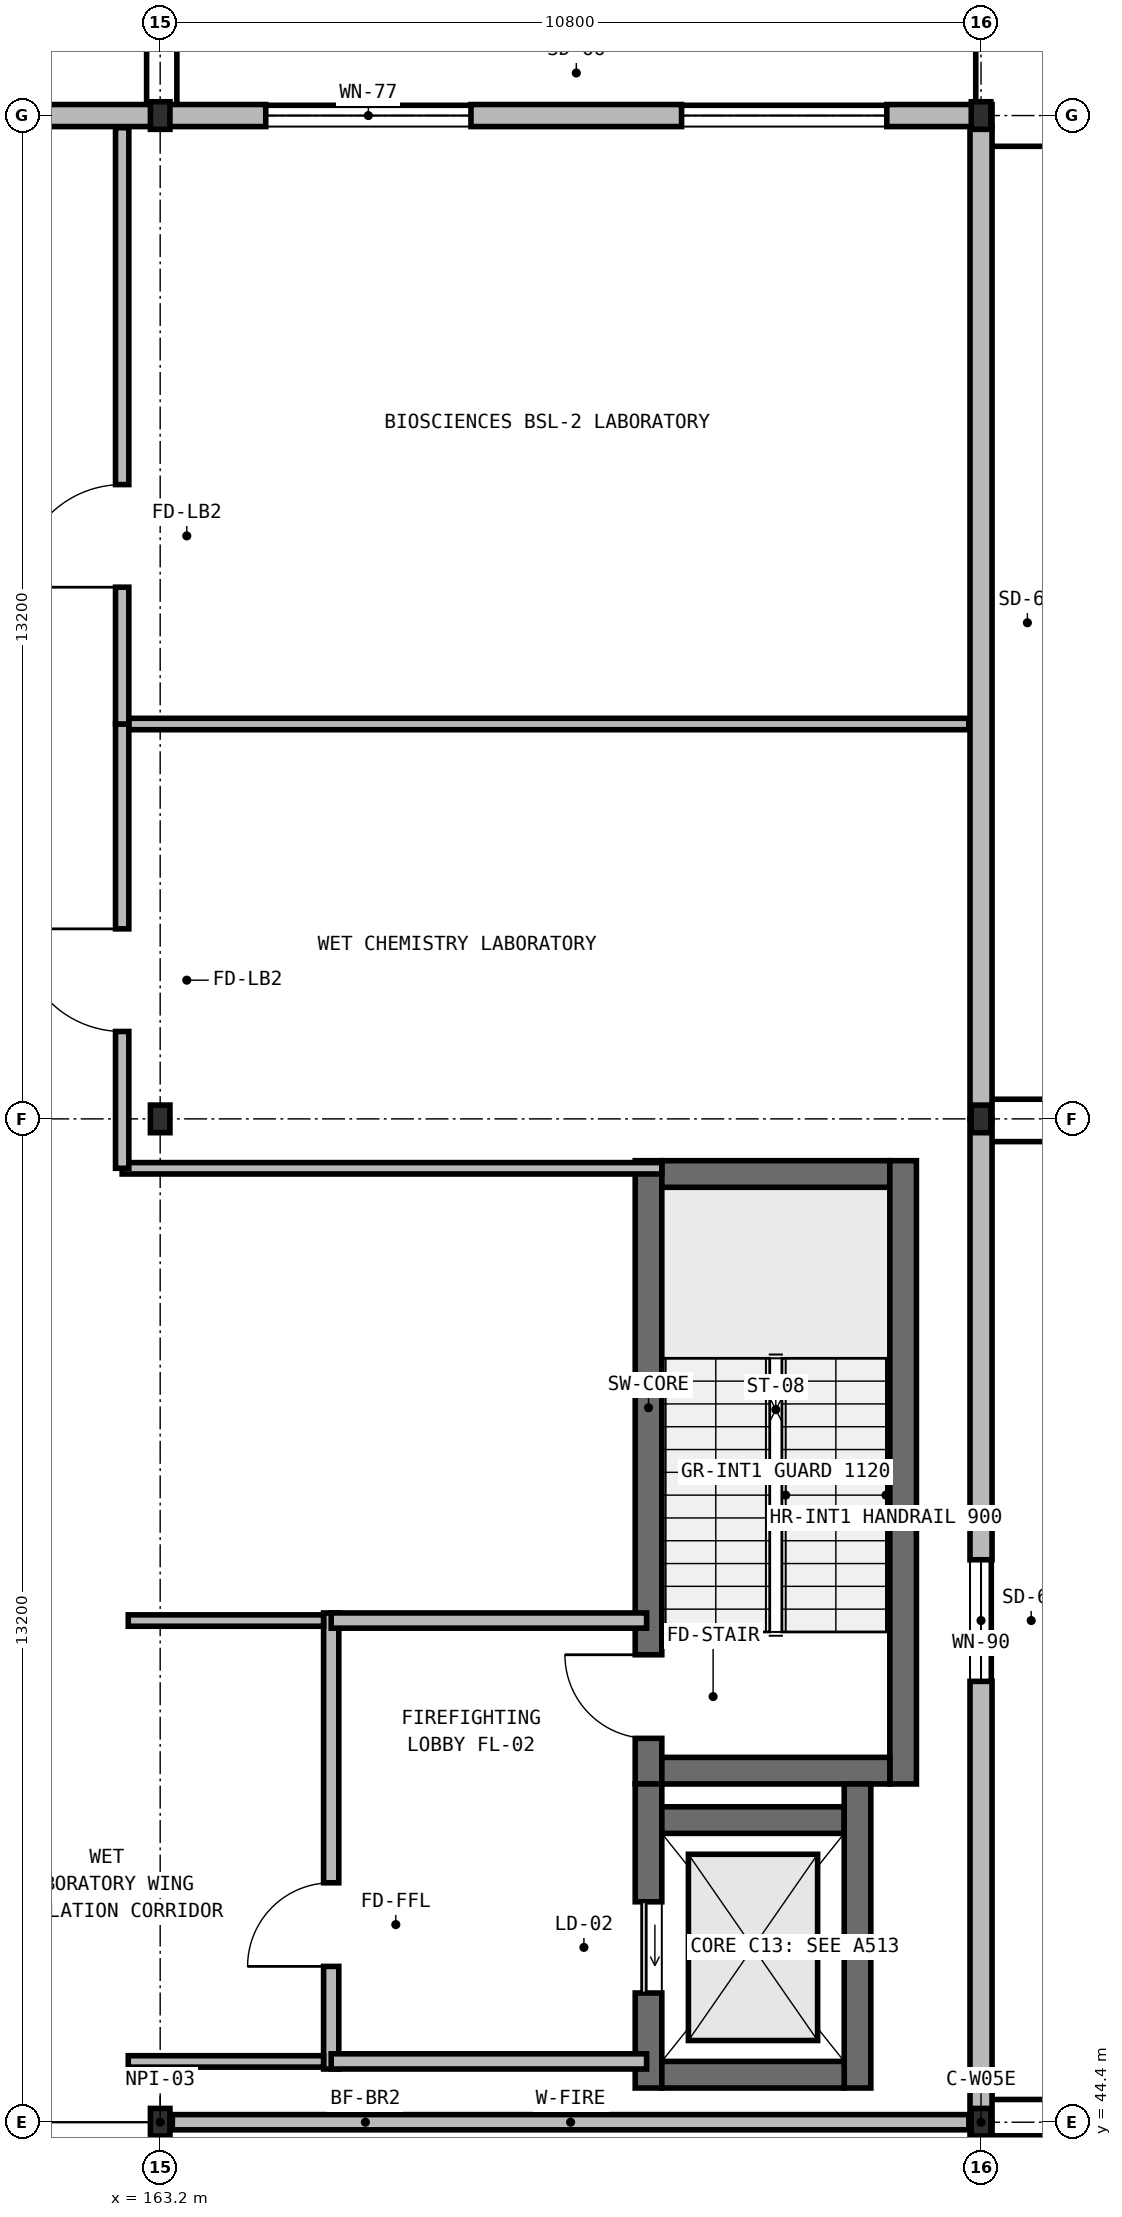
"""IFC4 building model, lengths in metres.
Left out: names, types, materials, properties, quantities, classifications, styles, units other than length and angle.
Written with IfcOpenShell. Run it as: python <this file> out.ifc"""

import sys

from ifc_helpers import new_model, si_unit, direction, frame, frame_2d, origin, origin_2d, place, context, subcontext, project, spatial, rectangle, i_section, extrude, element, fill, save


model = new_model("IFC4")
c1 = context("Model", 3, precision=1e-05, world=origin(), true_north=direction((0.0, 1.0)))
c2 = subcontext(c1, "Body", "Model", "MODEL_VIEW")
j1 = project(units=[si_unit("LENGTHUNIT", "METRE"), si_unit("PLANEANGLEUNIT", "RADIAN")], contexts=[c1])
p1 = place(None, origin())
s1 = spatial("IfcSite", under=j1, at=p1, CompositionType="ELEMENT")
p2 = place(p1, origin())
s2 = spatial("IfcBuilding", under=s1, at=p2, CompositionType="ELEMENT")
p3 = place(p2, frame((0.0, 0.0, 32.55)))
s3 = spatial("IfcBuildingStorey", under=s2, at=p3, CompositionType="ELEMENT", Elevation=32.55)
p4 = place(p3, frame((169.625, 48.85, 0.0), z_axis=(0.0, 0.0, 1.0), x_axis=(0.0, 1.0, 0.0)))
e1 = element("IfcWall", 1, at=p4, inside=s3, PredefinedType="SHEAR", context=c2, shape_type="SweptSolid", body=[
    extrude(rectangle(XDim=8.2, YDim=0.35, at=frame_2d((4.1, 0.0))), origin(), (0.0, 0.0, 1.0), 4.55),
])
p5 = place(p4, frame((0.6, 0.0, 0.0)))
e2 = element("IfcOpeningElement", 2, at=p5, cuts=e1, PredefinedType="OPENING", context=c2, shape_type="SweptSolid", body=[
    extrude(rectangle(XDim=1.1, YDim=2.15, at=frame_2d((0.55, 1.075))), frame((0.0, 0.185, 0.0), z_axis=(0.0, -1.0, 0.0), x_axis=(1.0, 0.0, 0.0)), (0.0, 0.0, 1.0), 0.37),
])
p6 = place(p3, frame((169.8, 56.875, 0.0), z_axis=(0.0, 0.0, 1.0), x_axis=(1.0, 0.0, 0.0)))
e3 = element("IfcWall", 3, at=p6, inside=s3, PredefinedType="SHEAR", context=c2, shape_type="SweptSolid", body=[
    extrude(rectangle(XDim=3.0, YDim=0.35, at=frame_2d((1.5, 0.0))), origin(), (0.0, 0.0, 1.0), 4.55),
])
p7 = place(p3, frame((172.975, 57.05, 0.0), z_axis=(0.0, 0.0, 1.0), x_axis=(0.0, -1.0, 0.0)))
e4 = element("IfcWall", 4, at=p7, inside=s3, PredefinedType="SHEAR", context=c2, shape_type="SweptSolid", body=[
    extrude(rectangle(XDim=8.2, YDim=0.35, at=frame_2d((4.1, 0.0))), origin(), (0.0, 0.0, 1.0), 4.55),
])
p8 = place(p3, frame((172.8, 49.025, 0.0), z_axis=(0.0, 0.0, 1.0), x_axis=(-1.0, 0.0, 0.0)))
e5 = element("IfcWall", 5, at=p8, inside=s3, PredefinedType="SHEAR", context=c2, shape_type="SweptSolid", body=[
    extrude(rectangle(XDim=3.0, YDim=0.35, at=frame_2d((1.5, 0.0))), origin(), (0.0, 0.0, 1.0), 4.55),
])
p9 = place(p3, frame((169.625, 44.85, 0.0), z_axis=(0.0, 0.0, 1.0), x_axis=(0.0, 1.0, 0.0)))
e6 = element("IfcWall", 6, at=p9, inside=s3, PredefinedType="SHEAR", context=c2, shape_type="SweptSolid", body=[
    extrude(rectangle(XDim=4.0, YDim=0.35, at=frame_2d((2.0, 0.0))), origin(), (0.0, 0.0, 1.0), 4.55),
])
p10 = place(p9, frame((1.25, 0.0, 0.0)))
e7 = element("IfcOpeningElement", 7, at=p10, cuts=e6, PredefinedType="OPENING", context=c2, shape_type="SweptSolid", body=[
    extrude(rectangle(XDim=1.2, YDim=2.15, at=frame_2d((0.6, 1.075))), frame((0.0, 0.185, 0.0), z_axis=(0.0, -1.0, 0.0), x_axis=(1.0, 0.0, 0.0)), (0.0, 0.0, 1.0), 0.37),
])
p11 = place(p3, frame((169.8, 48.375, 0.0), z_axis=(0.0, 0.0, 1.0), x_axis=(1.0, 0.0, 0.0)))
e8 = element("IfcWall", 8, at=p11, inside=s3, PredefinedType="SHEAR", context=c2, shape_type="SweptSolid", body=[
    extrude(rectangle(XDim=2.4, YDim=0.35, at=frame_2d((1.2, 0.0))), origin(), (0.0, 0.0, 1.0), 4.55),
])
p12 = place(p3, frame((172.375, 48.85, 0.0), z_axis=(0.0, 0.0, 1.0), x_axis=(0.0, -1.0, 0.0)))
e9 = element("IfcWall", 9, at=p12, inside=s3, PredefinedType="SHEAR", context=c2, shape_type="SweptSolid", body=[
    extrude(rectangle(XDim=4.0, YDim=0.35, at=frame_2d((2.0, 0.0))), origin(), (0.0, 0.0, 1.0), 4.55),
])
p13 = place(p3, frame((172.2, 45.025, 0.0), z_axis=(0.0, 0.0, 1.0), x_axis=(-1.0, 0.0, 0.0)))
e10 = element("IfcWall", 10, at=p13, inside=s3, PredefinedType="SHEAR", context=c2, shape_type="SweptSolid", body=[
    extrude(rectangle(XDim=2.4, YDim=0.35, at=frame_2d((1.2, 0.0))), origin(), (0.0, 0.0, 1.0), 4.55),
])
for number, where, z_axis, x_axis in (
    (11, (163.2, 44.4, 0.0), (0.0, 0.0, 1.0), (1.0, 0.0, 0.0)),
    (12, (163.2, 57.6, 0.0), (0.0, 0.0, 1.0), (1.0, 0.0, 0.0)),
    (13, (163.2, 70.8, 0.0), (0.0, 0.0, 1.0), (1.0, 0.0, 0.0)),
    (14, (174.0, 44.4, 0.0), (0.0, 0.0, 1.0), (1.0, 0.0, 0.0)),
    (15, (174.0, 57.6, 0.0), (0.0, 0.0, 1.0), (1.0, 0.0, 0.0)),
    (16, (174.0, 70.8, 0.0), (0.0, 0.0, 1.0), (1.0, 0.0, 0.0)),
):
    element("IfcColumn", number, at=place(p3, frame(where, z_axis=z_axis, x_axis=x_axis)), inside=s3, PredefinedType="COLUMN", context=c2, shape_type="SweptSolid", body=[
        extrude(i_section(OverallWidth=0.257, OverallDepth=0.363, WebThickness=0.013, FlangeThickness=0.022, at=origin_2d()), origin(), (0.0, 0.0, 1.0), 4.55),
    ])
p14 = place(p3, frame((153.455, 70.8, 0.0), z_axis=(0.0, 0.0, 1.0), x_axis=(1.0, 0.0, 0.0)))
e17 = element("IfcWall", 17, at=p14, inside=s3, PredefinedType="SOLIDWALL", context=c2, shape_type="SweptSolid", body=[
    extrude(rectangle(XDim=9.741, YDim=0.29, at=frame_2d((4.871, 0.0))), origin(), (0.0, 0.0, 1.0), 3.763),
])
p15 = place(p14, frame((1.25, 0.0, 0.95)))
e18 = element("IfcOpeningElement", 18, at=p15, cuts=e17, PredefinedType="OPENING", context=c2, shape_type="SweptSolid", body=[
    extrude(rectangle(XDim=2.37, YDim=1.8, at=frame_2d((1.185, 0.9))), frame((0.0, 0.155, 0.0), z_axis=(0.0, -1.0, 0.0), x_axis=(1.0, 0.0, 0.0)), (0.0, 0.0, 1.0), 0.31),
])
p16 = place(p3, frame((163.204, 70.8, 0.0), z_axis=(0.0, 0.0, 1.0), x_axis=(1.0, 0.0, 0.0)))
e19 = element("IfcWall", 19, at=p16, inside=s3, PredefinedType="SOLIDWALL", context=c2, shape_type="SweptSolid", body=[
    extrude(rectangle(XDim=10.941, YDim=0.29, at=frame_2d((5.47, 0.0))), origin(), (0.0, 0.0, 1.0), 3.685),
])
p17 = place(p16, frame((1.385, 0.0, 0.95)))
e20 = element("IfcOpeningElement", 20, at=p17, cuts=e19, PredefinedType="OPENING", context=c2, shape_type="SweptSolid", body=[
    extrude(rectangle(XDim=2.7, YDim=1.72, at=frame_2d((1.35, 0.86))), frame((0.0, 0.155, 0.0), z_axis=(0.0, -1.0, 0.0), x_axis=(1.0, 0.0, 0.0)), (0.0, 0.0, 1.0), 0.31),
])
p18 = place(p16, frame((6.856, 0.0, 0.95)))
e21 = element("IfcOpeningElement", 21, at=p18, cuts=e19, PredefinedType="OPENING", context=c2, shape_type="SweptSolid", body=[
    extrude(rectangle(XDim=2.7, YDim=1.72, at=frame_2d((1.35, 0.86))), frame((0.0, 0.155, 0.0), z_axis=(0.0, -1.0, 0.0), x_axis=(1.0, 0.0, 0.0)), (0.0, 0.0, 1.0), 0.31),
])
p19 = place(p3, frame((174.0, 70.651, 0.0), z_axis=(0.0, 0.0, 1.0), x_axis=(0.0, -1.0, 0.0)))
e22 = element("IfcWall", 22, at=p19, inside=s3, PredefinedType="SOLIDWALL", context=c2, shape_type="SweptSolid", body=[
    extrude(rectangle(XDim=13.047, YDim=0.29, at=frame_2d((6.523, 0.0))), origin(), (0.0, 0.0, 1.0), 3.767),
])
p20 = place(p3, frame((174.0, 57.596, 0.0), z_axis=(0.0, 0.0, 1.0), x_axis=(0.0, -1.0, 0.0)))
e23 = element("IfcWall", 23, at=p20, inside=s3, PredefinedType="SOLIDWALL", context=c2, shape_type="SweptSolid", body=[
    extrude(rectangle(XDim=13.192, YDim=0.29, at=frame_2d((6.596, 0.0))), origin(), (0.0, 0.0, 1.0), 3.83),
])
p21 = place(p20, frame((5.796, 0.0, 0.95)))
e24 = element("IfcOpeningElement", 24, at=p21, cuts=e23, PredefinedType="OPENING", context=c2, shape_type="SweptSolid", body=[
    extrude(rectangle(XDim=1.6, YDim=1.56, at=frame_2d((0.8, 0.78))), frame((0.0, 0.155, 0.0), z_axis=(0.0, -1.0, 0.0), x_axis=(1.0, 0.0, 0.0)), (0.0, 0.0, 1.0), 0.31),
])
p22 = place(p3, frame((174.0, 44.396, 0.0), z_axis=(0.0, 0.0, 1.0), x_axis=(0.0, -1.0, 0.0)))
e25 = element("IfcWall", 25, at=p22, inside=s3, PredefinedType="SOLIDWALL", context=c2, shape_type="SweptSolid", body=[
    extrude(rectangle(XDim=9.592, YDim=0.29, at=frame_2d((4.796, 0.0))), origin(), (0.0, 0.0, 1.0), 3.899),
])
p23 = place(p22, frame((3.831, 0.0, 0.95)))
e26 = element("IfcOpeningElement", 26, at=p23, cuts=e25, PredefinedType="OPENING", context=c2, shape_type="SweptSolid", body=[
    extrude(rectangle(XDim=1.93, YDim=1.48, at=frame_2d((0.965, 0.74))), frame((0.0, 0.155, 0.0), z_axis=(0.0, -1.0, 0.0), x_axis=(1.0, 0.0, 0.0)), (0.0, 0.0, 1.0), 0.31),
])
p24 = place(p3, frame((163.36, 44.4, 0.0), z_axis=(0.0, 0.0, 1.0), x_axis=(1.0, 0.0, 0.0)))
e27 = element("IfcWall", 27, at=p24, inside=s3, PredefinedType="SOLIDWALL", context=c2, shape_type="SweptSolid", body=[
    extrude(rectangle(XDim=10.48, YDim=0.2, at=frame_2d((5.24, 0.0))), origin(), (0.0, 0.0, 1.0), 3.753),
])
p25 = place(p3, frame((165.45, 45.1, 0.0), z_axis=(0.0, 0.0, 1.0), x_axis=(0.0, 1.0, 0.0)))
e28 = element("IfcWall", 28, at=p25, inside=s3, PredefinedType="SOLIDWALL", context=c2, shape_type="SweptSolid", body=[
    extrude(rectangle(XDim=6.0, YDim=0.2, at=frame_2d((3.0, 0.0))), origin(), (0.0, 0.0, 1.0), 4.3),
])
p26 = place(p25, frame((1.35, 0.0, 0.0)))
e29 = element("IfcOpeningElement", 29, at=p26, cuts=e28, PredefinedType="OPENING", context=c2, shape_type="SweptSolid", body=[
    extrude(rectangle(XDim=1.1, YDim=2.15, at=frame_2d((0.55, 1.075))), frame((0.0, 0.11, 0.0), z_axis=(0.0, -1.0, 0.0), x_axis=(1.0, 0.0, 0.0)), (0.0, 0.0, 1.0), 0.22),
])
for number, where, z_axis, x_axis in (
    (30, (165.45, 45.2, 0.0), (0.0, 0.0, 1.0), (1.0, 0.0, 0.0)),
    (31, (165.45, 51.0, 0.0), (0.0, 0.0, 1.0), (1.0, 0.0, 0.0)),
):
    element("IfcWall", number, at=place(p3, frame(where, z_axis=z_axis, x_axis=x_axis)), inside=s3, PredefinedType="SOLIDWALL", context=c2, shape_type="SweptSolid", body=[
        extrude(rectangle(XDim=4.15, YDim=0.2, at=frame_2d((2.075, 0.0))), origin(), (0.0, 0.0, 1.0), 4.3),
    ])
p27 = place(p3, frame((162.7, 56.95, 0.0), z_axis=(0.0, 0.0, 1.0), x_axis=(1.0, 0.0, 0.0)))
e32 = element("IfcWall", 32, at=p27, inside=s3, PredefinedType="PARTITIONING", context=c2, shape_type="SweptSolid", body=[
    extrude(rectangle(XDim=7.1, YDim=0.15, at=frame_2d((3.55, 0.0))), origin(), (0.0, 0.0, 1.0), 4.3),
])
p28 = place(p3, frame((162.7, 56.95, 0.0), z_axis=(0.0, 0.0, 1.0), x_axis=(0.0, 1.0, 0.0)))
e33 = element("IfcWall", 33, at=p28, inside=s3, PredefinedType="PARTITIONING", context=c2, shape_type="SweptSolid", body=[
    extrude(rectangle(XDim=5.845, YDim=0.175, at=frame_2d((2.922, 0.0))), origin(), (0.0, 0.0, 1.0), 4.3),
])
p29 = place(p28, frame((1.8, 0.0, 0.0)))
e34 = element("IfcOpeningElement", 34, at=p29, cuts=e33, PredefinedType="OPENING", context=c2, shape_type="SweptSolid", body=[
    extrude(rectangle(XDim=1.35, YDim=2.2, at=frame_2d((0.675, 1.1))), frame((0.0, 0.097, 0.0), z_axis=(0.0, -1.0, 0.0), x_axis=(1.0, 0.0, 0.0)), (0.0, 0.0, 1.0), 0.195),
])
p30 = place(p3, frame((162.7, 62.795, 0.0), z_axis=(0.0, 0.0, 1.0), x_axis=(0.0, 1.0, 0.0)))
e35 = element("IfcWall", 35, at=p30, inside=s3, PredefinedType="PARTITIONING", context=c2, shape_type="SweptSolid", body=[
    extrude(rectangle(XDim=7.845, YDim=0.175, at=frame_2d((3.922, 0.0))), origin(), (0.0, 0.0, 1.0), 4.3),
])
p31 = place(p30, frame((1.8, 0.0, 0.0)))
e36 = element("IfcOpeningElement", 36, at=p31, cuts=e35, PredefinedType="OPENING", context=c2, shape_type="SweptSolid", body=[
    extrude(rectangle(XDim=1.35, YDim=2.2, at=frame_2d((0.675, 1.1))), frame((0.0, 0.097, 0.0), z_axis=(0.0, -1.0, 0.0), x_axis=(1.0, 0.0, 0.0)), (0.0, 0.0, 1.0), 0.195),
])
p32 = place(p3, frame((162.79, 62.795, 0.0), z_axis=(0.0, 0.0, 1.0), x_axis=(1.0, 0.0, 0.0)))
e37 = element("IfcWall", 37, at=p32, inside=s3, PredefinedType="PARTITIONING", context=c2, shape_type="SweptSolid", body=[
    extrude(rectangle(XDim=11.05, YDim=0.15, at=frame_2d((5.525, 0.0))), origin(), (0.0, 0.0, 1.0), 4.3),
])
for number, where, z_axis, x_axis in (
    (38, (162.78, 45.2, 0.0), (0.0, 0.0, 1.0), (1.0, 0.0, 0.0)),
    (39, (162.78, 51.0, 0.0), (0.0, 0.0, 1.0), (1.0, 0.0, 0.0)),
):
    element("IfcWall", number, at=place(p3, frame(where, z_axis=z_axis, x_axis=x_axis)), inside=s3, PredefinedType="PARTITIONING", context=c2, shape_type="SweptSolid", body=[
        extrude(rectangle(XDim=2.57, YDim=0.15, at=frame_2d((1.285, 0.0))), origin(), (0.0, 0.0, 1.0), 4.3),
    ])
p33 = place(p17, origin())
e40 = element("IfcWindow", 40, at=p33, inside=s3, PartitioningType="SINGLE_PANEL", PredefinedType="WINDOW", context=c2, shape_type="SweptSolid", body=[
    extrude(rectangle(XDim=2.7, YDim=1.72, at=frame_2d((1.35, 0.86))), frame((0.0, 0.03, 0.0), z_axis=(0.0, -1.0, 0.0), x_axis=(1.0, 0.0, 0.0)), (0.0, 0.0, 1.0), 0.06),
])
fill(e20, e40)
p34 = place(p18, origin())
e41 = element("IfcWindow", 41, at=p34, inside=s3, PartitioningType="SINGLE_PANEL", PredefinedType="WINDOW", context=c2, shape_type="SweptSolid", body=[
    extrude(rectangle(XDim=2.7, YDim=1.72, at=frame_2d((1.35, 0.86))), frame((0.0, 0.03, 0.0), z_axis=(0.0, -1.0, 0.0), x_axis=(1.0, 0.0, 0.0)), (0.0, 0.0, 1.0), 0.06),
])
fill(e21, e41)
p35 = place(p21, origin())
e42 = element("IfcWindow", 42, at=p35, inside=s3, PartitioningType="SINGLE_PANEL", PredefinedType="WINDOW", context=c2, shape_type="SweptSolid", body=[
    extrude(rectangle(XDim=1.6, YDim=1.56, at=frame_2d((0.8, 0.78))), frame((0.0, 0.03, 0.0), z_axis=(0.0, -1.0, 0.0), x_axis=(1.0, 0.0, 0.0)), (0.0, 0.0, 1.0), 0.06),
])
fill(e24, e42)
p36 = place(p5, origin())
e43 = element("IfcDoor", 43, at=p36, inside=s3, OperationType="SINGLE_SWING_RIGHT", PredefinedType="DOOR", context=c2, shape_type="SweptSolid", body=[
    extrude(rectangle(XDim=1.1, YDim=2.15, at=frame_2d((0.55, 1.075))), frame((0.0, 0.025, 0.0), z_axis=(0.0, -1.0, 0.0), x_axis=(1.0, 0.0, 0.0)), (0.0, 0.0, 1.0), 0.05),
])
fill(e2, e43)
p37 = place(p10, origin())
e44 = element("IfcDoor", 44, at=p37, inside=s3, OperationType="SLIDING_TO_LEFT", PredefinedType="USERDEFINED", context=c2, shape_type="SweptSolid", body=[
    extrude(rectangle(XDim=1.2, YDim=2.15, at=frame_2d((0.6, 1.075))), frame((0.0, 0.025, 0.0), z_axis=(0.0, -1.0, 0.0), x_axis=(1.0, 0.0, 0.0)), (0.0, 0.0, 1.0), 0.05),
])
fill(e7, e44)
p38 = place(p26, origin())
e45 = element("IfcDoor", 45, at=p38, inside=s3, OperationType="SINGLE_SWING_LEFT", PredefinedType="DOOR", context=c2, shape_type="SweptSolid", body=[
    extrude(rectangle(XDim=1.1, YDim=2.15, at=frame_2d((0.55, 1.075))), frame((0.0, 0.025, 0.0), z_axis=(0.0, -1.0, 0.0), x_axis=(1.0, 0.0, 0.0)), (0.0, 0.0, 1.0), 0.05),
])
fill(e29, e45)
p39 = place(p29, origin())
e46 = element("IfcDoor", 46, at=p39, inside=s3, OperationType="SINGLE_SWING_RIGHT", PredefinedType="DOOR", context=c2, shape_type="SweptSolid", body=[
    extrude(rectangle(XDim=1.35, YDim=2.2, at=frame_2d((0.675, 1.1))), frame((0.0, 0.025, 0.0), z_axis=(0.0, -1.0, 0.0), x_axis=(1.0, 0.0, 0.0)), (0.0, 0.0, 1.0), 0.05),
])
fill(e34, e46)
p40 = place(p31, origin())
e47 = element("IfcDoor", 47, at=p40, inside=s3, OperationType="SINGLE_SWING_LEFT", PredefinedType="DOOR", context=c2, shape_type="SweptSolid", body=[
    extrude(rectangle(XDim=1.35, YDim=2.2, at=frame_2d((0.675, 1.1))), frame((0.0, 0.025, 0.0), z_axis=(0.0, -1.0, 0.0), x_axis=(1.0, 0.0, 0.0)), (0.0, 0.0, 1.0), 0.05),
])
fill(e36, e47)
save(model, sys.argv[1])
